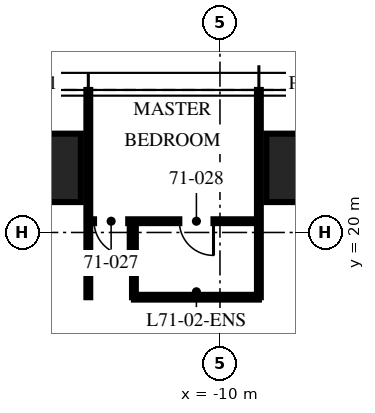
"""IFC4 building model, lengths in metres.
Left out: names, types, materials, properties, quantities, classifications, styles, units other than length and angle.
Written with IfcOpenShell. Run it as: python <this file> out.ifc"""

import sys

from ifc_helpers import new_model, si_unit, direction, frame, frame_2d, origin, origin_2d, place, context, subcontext, project, spatial, rectangle, extrude, element, fill, save


model = new_model("IFC4")
c1 = context("Model", 3, precision=1e-05, world=origin(), true_north=direction((0.0, 1.0)))
c2 = subcontext(c1, "Body", "Model", "MODEL_VIEW")
j1 = project(units=[si_unit("LENGTHUNIT", "METRE"), si_unit("PLANEANGLEUNIT", "RADIAN")], contexts=[c1])
p1 = place(None, origin())
s1 = spatial("IfcSite", under=j1, at=p1, CompositionType="ELEMENT")
p2 = place(p1, origin())
s2 = spatial("IfcBuilding", under=s1, at=p2, CompositionType="ELEMENT")
p3 = place(p2, frame((0.0, 0.0, 285.75)))
s3 = spatial("IfcBuildingStorey", under=s2, at=p3, CompositionType="ELEMENT", Elevation=285.75)
p4 = place(p3, frame((-14.96, 21.7, 0.04), z_axis=(0.0, 0.0, 1.0), x_axis=(1.0, 0.0, 0.0)))
e1 = element("IfcColumn", 1, at=p4, inside=s3, PredefinedType="COLUMN", context=c2, shape_type="SweptSolid", body=[
    extrude(rectangle(XDim=2.6, YDim=1.8, at=origin_2d()), origin(), (0.0, 0.0, 1.0), 3.71),
])
p5 = place(p3, frame((-7.48, 21.7, -0.09), z_axis=(0.0, 0.0, 1.0), x_axis=(1.0, 0.0, 0.0)))
e2 = element("IfcColumn", 2, at=p5, inside=s3, PredefinedType="COLUMN", context=c2, shape_type="SweptSolid", body=[
    extrude(rectangle(XDim=2.6, YDim=1.8, at=origin_2d()), origin(), (0.0, 0.0, 1.0), 3.84),
])
for number, where, z_axis, x_axis in (
    (3, (-8.976, 18.296, 0.0), (0.0, 0.0, 1.0), (0.0, 1.0, 0.0)),
    (4, (-13.464, 18.296, 0.0), (0.0, 0.0, 1.0), (0.0, 1.0, 0.0)),
):
    element("IfcWall", number, at=place(p3, frame(where, z_axis=z_axis, x_axis=x_axis)), inside=s3, PredefinedType="PARTITIONING", context=c2, shape_type="SweptSolid", body=[
        extrude(rectangle(XDim=5.454, YDim=0.1, at=frame_2d((2.727, 0.0))), origin(), (0.0, 0.0, 1.0), 3.01),
    ])
p6 = place(p3, frame((-8.976, 20.296, 0.0), z_axis=(0.0, 0.0, 1.0), x_axis=(-1.0, 0.0, 0.0)))
e5 = element("IfcWall", 5, at=p6, inside=s3, PredefinedType="PARTITIONING", context=c2, shape_type="SweptSolid", body=[
    extrude(rectangle(XDim=4.488, YDim=0.1, at=frame_2d((2.244, 0.0))), origin(), (0.0, 0.0, 1.0), 2.91),
])
p7 = place(p6, frame((3.438, 0.0, 0.0)))
e6 = element("IfcOpeningElement", 6, at=p7, cuts=e5, PredefinedType="OPENING", context=c2, shape_type="SweptSolid", body=[
    extrude(rectangle(XDim=0.9, YDim=2.1, at=frame_2d((0.45, 1.05))), frame((0.0, 0.06, 0.0), z_axis=(0.0, -1.0, 0.0), x_axis=(1.0, 0.0, 0.0)), (0.0, 0.0, 1.0), 0.12),
])
p8 = place(p6, frame((1.194, 0.0, 0.0)))
e7 = element("IfcOpeningElement", 7, at=p8, cuts=e5, PredefinedType="OPENING", context=c2, shape_type="SweptSolid", body=[
    extrude(rectangle(XDim=0.9, YDim=2.1, at=frame_2d((0.45, 1.05))), frame((0.0, 0.06, 0.0), z_axis=(0.0, -1.0, 0.0), x_axis=(1.0, 0.0, 0.0)), (0.0, 0.0, 1.0), 0.12),
])
p9 = place(p3, frame((-12.264, 18.296, 0.0), z_axis=(0.0, 0.0, 1.0), x_axis=(0.0, 1.0, 0.0)))
e8 = element("IfcWall", 8, at=p9, inside=s3, PredefinedType="PARTITIONING", context=c2, shape_type="SweptSolid", body=[
    extrude(rectangle(XDim=2.0, YDim=0.1, at=frame_2d((1.0, 0.0))), origin(), (0.0, 0.0, 1.0), 3.5),
])
p10 = place(p3, frame((-8.976, 18.296, 0.0), z_axis=(0.0, 0.0, 1.0), x_axis=(-1.0, 0.0, 0.0)))
e9 = element("IfcWall", 9, at=p10, inside=s3, PredefinedType="PARTITIONING", context=c2, shape_type="SweptSolid", body=[
    extrude(rectangle(XDim=3.288, YDim=0.125, at=frame_2d((1.644, 0.0))), origin(), (0.0, 0.0, 1.0), 2.91),
])
p11 = place(p7, origin())
e10 = element("IfcDoor", 10, at=p11, inside=s3, OperationType="SINGLE_SWING_LEFT", PredefinedType="DOOR", context=c2, shape_type="SweptSolid", body=[
    extrude(rectangle(XDim=0.9, YDim=2.1, at=frame_2d((0.45, 1.05))), frame((0.0, 0.025, 0.0), z_axis=(0.0, -1.0, 0.0), x_axis=(1.0, 0.0, 0.0)), (0.0, 0.0, 1.0), 0.05),
])
fill(e6, e10)
p12 = place(p8, origin())
e11 = element("IfcDoor", 11, at=p12, inside=s3, OperationType="SINGLE_SWING_LEFT", PredefinedType="DOOR", context=c2, shape_type="SweptSolid", body=[
    extrude(rectangle(XDim=0.9, YDim=2.1, at=frame_2d((0.45, 1.05))), frame((0.0, 0.025, 0.0), z_axis=(0.0, -1.0, 0.0), x_axis=(1.0, 0.0, 0.0)), (0.0, 0.0, 1.0), 0.05),
])
fill(e7, e11)
save(model, sys.argv[1])
